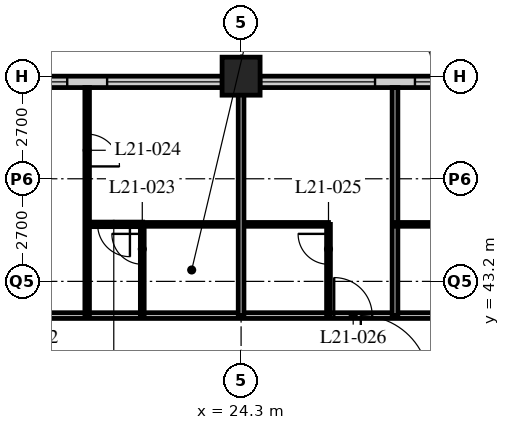
"""IFC4 building model, lengths in metres.
Left out: names, types, materials, properties, quantities, classifications, styles, units other than length and angle.
Written with IfcOpenShell. Run it as: python <this file> out.ifc"""

import sys

from ifc_helpers import new_model, si_unit, direction, frame, frame_2d, origin, origin_2d, place, context, subcontext, project, spatial, rectangle, hollow_rectangle, extrude, element, fill, save


model = new_model("IFC4")
c1 = context("Model", 3, precision=1e-05, world=origin(), true_north=direction((0.0, 1.0)))
c2 = subcontext(c1, "Body", "Model", "MODEL_VIEW")
j1 = project(units=[si_unit("LENGTHUNIT", "METRE"), si_unit("PLANEANGLEUNIT", "RADIAN")], contexts=[c1])
p1 = place(None, origin())
s1 = spatial("IfcSite", under=j1, at=p1, CompositionType="ELEMENT")
p2 = place(p1, origin())
s2 = spatial("IfcBuilding", under=s1, at=p2, CompositionType="ELEMENT")
p3 = place(p2, frame((0.0, 0.0, 84.0)))
s3 = spatial("IfcBuildingStorey", under=s2, at=p3, CompositionType="ELEMENT", Elevation=84.0)
p4 = place(p3, frame((24.3, 48.6, 0.0), z_axis=(0.0, 0.0, 1.0), x_axis=(1.0, 0.0, 0.0)))
e1 = element("IfcColumn", 1, at=p4, inside=s3, PredefinedType="COLUMN", context=c2, shape_type="SweptSolid", body=[
    extrude(hollow_rectangle(XDim=1.0, YDim=1.0, WallThickness=0.1, at=origin_2d()), origin(), (0.0, 0.0, 1.0), 3.4),
])
p5 = place(p3, frame((48.3, 48.45, 0.0), z_axis=(0.0, 0.0, 1.0), x_axis=(-1.0, 0.0, 0.0)))
e2 = element("IfcWall", 2, at=p5, inside=s3, PredefinedType="SOLIDWALL", context=c2, shape_type="SweptSolid", body=[
    extrude(rectangle(XDim=40.2, YDim=0.3, at=frame_2d((20.1, 0.0))), origin(), (0.0, 0.0, 1.0), 3.19),
])
p6 = place(p5, frame((0.225, 0.0, 0.9)))
e3 = element("IfcOpeningElement", 3, at=p6, cuts=e2, PredefinedType="OPENING", context=c2, shape_type="SweptSolid", body=[
    extrude(rectangle(XDim=3.0, YDim=1.5, at=frame_2d((1.5, 0.75))), frame((0.0, 0.16, 0.0), z_axis=(0.0, -1.0, 0.0), x_axis=(1.0, 0.0, 0.0)), (0.0, 0.0, 1.0), 0.32),
])
p7 = place(p5, frame((4.275, 0.0, 0.9)))
e4 = element("IfcOpeningElement", 4, at=p7, cuts=e2, PredefinedType="OPENING", context=c2, shape_type="SweptSolid", body=[
    extrude(rectangle(XDim=3.0, YDim=1.5, at=frame_2d((1.5, 0.75))), frame((0.0, 0.16, 0.0), z_axis=(0.0, -1.0, 0.0), x_axis=(1.0, 0.0, 0.0)), (0.0, 0.0, 1.0), 0.32),
])
p8 = place(p5, frame((8.325, 0.0, 0.9)))
e5 = element("IfcOpeningElement", 5, at=p8, cuts=e2, PredefinedType="OPENING", context=c2, shape_type="SweptSolid", body=[
    extrude(rectangle(XDim=3.0, YDim=1.5, at=frame_2d((1.5, 0.75))), frame((0.0, 0.16, 0.0), z_axis=(0.0, -1.0, 0.0), x_axis=(1.0, 0.0, 0.0)), (0.0, 0.0, 1.0), 0.32),
])
p9 = place(p5, frame((12.375, 0.0, 0.9)))
e6 = element("IfcOpeningElement", 6, at=p9, cuts=e2, PredefinedType="OPENING", context=c2, shape_type="SweptSolid", body=[
    extrude(rectangle(XDim=3.0, YDim=1.5, at=frame_2d((1.5, 0.75))), frame((0.0, 0.16, 0.0), z_axis=(0.0, -1.0, 0.0), x_axis=(1.0, 0.0, 0.0)), (0.0, 0.0, 1.0), 0.32),
])
p10 = place(p5, frame((16.425, 0.0, 0.9)))
e7 = element("IfcOpeningElement", 7, at=p10, cuts=e2, PredefinedType="OPENING", context=c2, shape_type="SweptSolid", body=[
    extrude(rectangle(XDim=3.0, YDim=1.5, at=frame_2d((1.5, 0.75))), frame((0.0, 0.16, 0.0), z_axis=(0.0, -1.0, 0.0), x_axis=(1.0, 0.0, 0.0)), (0.0, 0.0, 1.0), 0.32),
])
p11 = place(p5, frame((20.475, 0.0, 0.9)))
e8 = element("IfcOpeningElement", 8, at=p11, cuts=e2, PredefinedType="OPENING", context=c2, shape_type="SweptSolid", body=[
    extrude(rectangle(XDim=3.0, YDim=1.5, at=frame_2d((1.5, 0.75))), frame((0.0, 0.16, 0.0), z_axis=(0.0, -1.0, 0.0), x_axis=(1.0, 0.0, 0.0)), (0.0, 0.0, 1.0), 0.32),
])
p12 = place(p5, frame((24.525, 0.0, 0.9)))
e9 = element("IfcOpeningElement", 9, at=p12, cuts=e2, PredefinedType="OPENING", context=c2, shape_type="SweptSolid", body=[
    extrude(rectangle(XDim=3.0, YDim=1.5, at=frame_2d((1.5, 0.75))), frame((0.0, 0.16, 0.0), z_axis=(0.0, -1.0, 0.0), x_axis=(1.0, 0.0, 0.0)), (0.0, 0.0, 1.0), 0.32),
])
p13 = place(p5, frame((28.575, 0.0, 0.9)))
e10 = element("IfcOpeningElement", 10, at=p13, cuts=e2, PredefinedType="OPENING", context=c2, shape_type="SweptSolid", body=[
    extrude(rectangle(XDim=3.0, YDim=1.5, at=frame_2d((1.5, 0.75))), frame((0.0, 0.16, 0.0), z_axis=(0.0, -1.0, 0.0), x_axis=(1.0, 0.0, 0.0)), (0.0, 0.0, 1.0), 0.32),
])
p14 = place(p5, frame((32.625, 0.0, 0.9)))
e11 = element("IfcOpeningElement", 11, at=p14, cuts=e2, PredefinedType="OPENING", context=c2, shape_type="SweptSolid", body=[
    extrude(rectangle(XDim=3.0, YDim=1.5, at=frame_2d((1.5, 0.75))), frame((0.0, 0.16, 0.0), z_axis=(0.0, -1.0, 0.0), x_axis=(1.0, 0.0, 0.0)), (0.0, 0.0, 1.0), 0.32),
])
p15 = place(p5, frame((36.675, 0.0, 0.9)))
e12 = element("IfcOpeningElement", 12, at=p15, cuts=e2, PredefinedType="OPENING", context=c2, shape_type="SweptSolid", body=[
    extrude(rectangle(XDim=3.0, YDim=1.5, at=frame_2d((1.5, 0.75))), frame((0.0, 0.16, 0.0), z_axis=(0.0, -1.0, 0.0), x_axis=(1.0, 0.0, 0.0)), (0.0, 0.0, 1.0), 0.32),
])
p16 = place(p3, frame((12.15, 42.3, 0.0), z_axis=(0.0, 0.0, 1.0), x_axis=(1.0, 0.0, 0.0)))
e13 = element("IfcWall", 13, at=p16, inside=s3, PredefinedType="PARTITIONING", context=c2, shape_type="SweptSolid", body=[
    extrude(rectangle(XDim=32.4, YDim=0.15, at=frame_2d((16.2, 0.0))), origin(), (0.0, 0.0, 1.0), 3.19),
])
p17 = place(p16, frame((5.95, 0.0, 0.0)))
e14 = element("IfcOpeningElement", 14, at=p17, cuts=e13, PredefinedType="OPENING", context=c2, shape_type="SweptSolid", body=[
    extrude(rectangle(XDim=1.0, YDim=2.1, at=frame_2d((0.5, 1.05))), frame((0.0, 0.085, 0.0), z_axis=(0.0, -1.0, 0.0), x_axis=(1.0, 0.0, 0.0)), (0.0, 0.0, 1.0), 0.17),
])
p18 = place(p16, frame((14.6, 0.0, 0.0)))
e15 = element("IfcOpeningElement", 15, at=p18, cuts=e13, PredefinedType="OPENING", context=c2, shape_type="SweptSolid", body=[
    extrude(rectangle(XDim=1.0, YDim=2.1, at=frame_2d((0.5, 1.05))), frame((0.0, 0.085, 0.0), z_axis=(0.0, -1.0, 0.0), x_axis=(1.0, 0.0, 0.0)), (0.0, 0.0, 1.0), 0.17),
])
p19 = place(p16, frame((18.65, 0.0, 0.0)))
e16 = element("IfcOpeningElement", 16, at=p19, cuts=e13, PredefinedType="OPENING", context=c2, shape_type="SweptSolid", body=[
    extrude(rectangle(XDim=1.0, YDim=2.1, at=frame_2d((0.5, 1.05))), frame((0.0, 0.085, 0.0), z_axis=(0.0, -1.0, 0.0), x_axis=(1.0, 0.0, 0.0)), (0.0, 0.0, 1.0), 0.17),
])
p20 = place(p16, frame((22.15, 0.0, 0.0)))
e17 = element("IfcOpeningElement", 17, at=p20, cuts=e13, PredefinedType="OPENING", context=c2, shape_type="SweptSolid", body=[
    extrude(rectangle(XDim=1.0, YDim=2.1, at=frame_2d((0.5, 1.05))), frame((0.0, 0.085, 0.0), z_axis=(0.0, -1.0, 0.0), x_axis=(1.0, 0.0, 0.0)), (0.0, 0.0, 1.0), 0.17),
])
p21 = place(p16, frame((29.025, 0.0, 0.0)))
e18 = element("IfcOpeningElement", 18, at=p21, cuts=e13, PredefinedType="OPENING", context=c2, shape_type="SweptSolid", body=[
    extrude(rectangle(XDim=1.0, YDim=2.1, at=frame_2d((0.5, 1.05))), frame((0.0, 0.085, 0.0), z_axis=(0.0, -1.0, 0.0), x_axis=(1.0, 0.0, 0.0)), (0.0, 0.0, 1.0), 0.17),
])
p22 = place(p16, frame((2.375, 0.0, 0.0)))
e19 = element("IfcOpeningElement", 19, at=p22, cuts=e13, PredefinedType="OPENING", context=c2, shape_type="SweptSolid", body=[
    extrude(rectangle(XDim=1.0, YDim=2.1, at=frame_2d((0.5, 1.05))), frame((0.0, 0.085, 0.0), z_axis=(0.0, -1.0, 0.0), x_axis=(1.0, 0.0, 0.0)), (0.0, 0.0, 1.0), 0.17),
])
p23 = place(p3, frame((21.7, 44.7, 0.0), z_axis=(0.0, 0.0, 1.0), x_axis=(1.0, 0.0, 0.0)))
e20 = element("IfcWall", 20, at=p23, inside=s3, PredefinedType="PARTITIONING", context=c2, shape_type="SweptSolid", body=[
    extrude(rectangle(XDim=4.9, YDim=0.1, at=frame_2d((2.45, 0.0))), origin(), (0.0, 0.0, 1.0), 3.19),
])
p24 = place(p3, frame((21.7, 42.3, 0.0), z_axis=(0.0, 0.0, 1.0), x_axis=(0.0, 1.0, 0.0)))
e21 = element("IfcWall", 21, at=p24, inside=s3, PredefinedType="PARTITIONING", context=c2, shape_type="SweptSolid", body=[
    extrude(rectangle(XDim=2.4, YDim=0.1, at=frame_2d((1.2, 0.0))), origin(), (0.0, 0.0, 1.0), 3.19),
])
p25 = place(p24, frame((1.35, 0.0, 0.0)))
e22 = element("IfcOpeningElement", 22, at=p25, cuts=e21, PredefinedType="OPENING", context=c2, shape_type="SweptSolid", body=[
    extrude(rectangle(XDim=0.8, YDim=2.1, at=frame_2d((0.4, 1.05))), frame((0.0, 0.06, 0.0), z_axis=(0.0, -1.0, 0.0), x_axis=(1.0, 0.0, 0.0)), (0.0, 0.0, 1.0), 0.12),
])
p26 = place(p3, frame((20.25, 42.3, 0.0), z_axis=(0.0, 0.0, 1.0), x_axis=(0.0, 1.0, 0.0)))
e23 = element("IfcWall", 23, at=p26, inside=s3, PredefinedType="PARTITIONING", context=c2, shape_type="SweptSolid", body=[
    extrude(rectangle(XDim=6.0, YDim=0.12, at=frame_2d((3.0, 0.0))), origin(), (0.0, 0.0, 1.0), 3.19),
])
p27 = place(p26, frame((3.925, 0.0, 0.0)))
e24 = element("IfcOpeningElement", 24, at=p27, cuts=e23, PredefinedType="OPENING", context=c2, shape_type="SweptSolid", body=[
    extrude(rectangle(XDim=0.85, YDim=2.1, at=frame_2d((0.425, 1.05))), frame((0.0, 0.07, 0.0), z_axis=(0.0, -1.0, 0.0), x_axis=(1.0, 0.0, 0.0)), (0.0, 0.0, 1.0), 0.14),
])
p28 = place(p3, frame((24.3, 42.3, 0.0), z_axis=(0.0, 0.0, 1.0), x_axis=(0.0, 1.0, 0.0)))
e25 = element("IfcWall", 25, at=p28, inside=s3, PredefinedType="PARTITIONING", context=c2, shape_type="SweptSolid", body=[
    extrude(rectangle(XDim=6.0, YDim=0.15, at=frame_2d((3.0, 0.0))), origin(), (0.0, 0.0, 1.0), 2.428),
])
p29 = place(p3, frame((26.6, 42.3, 0.0), z_axis=(0.0, 0.0, 1.0), x_axis=(0.0, 1.0, 0.0)))
e26 = element("IfcWall", 26, at=p29, inside=s3, PredefinedType="PARTITIONING", context=c2, shape_type="SweptSolid", body=[
    extrude(rectangle(XDim=2.4, YDim=0.1, at=frame_2d((1.2, 0.0))), origin(), (0.0, 0.0, 1.0), 3.19),
])
p30 = place(p29, frame((1.35, 0.0, 0.0)))
e27 = element("IfcOpeningElement", 27, at=p30, cuts=e26, PredefinedType="OPENING", context=c2, shape_type="SweptSolid", body=[
    extrude(rectangle(XDim=0.8, YDim=2.1, at=frame_2d((0.4, 1.05))), frame((0.0, 0.06, 0.0), z_axis=(0.0, -1.0, 0.0), x_axis=(1.0, 0.0, 0.0)), (0.0, 0.0, 1.0), 0.12),
])
p31 = place(p3, frame((28.35, 42.3, 0.0), z_axis=(0.0, 0.0, 1.0), x_axis=(0.0, 1.0, 0.0)))
e28 = element("IfcWall", 28, at=p31, inside=s3, PredefinedType="PARTITIONING", context=c2, shape_type="SweptSolid", body=[
    extrude(rectangle(XDim=6.0, YDim=0.15, at=frame_2d((3.0, 0.0))), origin(), (0.0, 0.0, 1.0), 3.19),
])
p32 = place(p3, frame((28.35, 44.7, 0.0), z_axis=(0.0, 0.0, 1.0), x_axis=(1.0, 0.0, 0.0)))
e29 = element("IfcWall", 29, at=p32, inside=s3, PredefinedType="PARTITIONING", context=c2, shape_type="SweptSolid", body=[
    extrude(rectangle(XDim=2.3, YDim=0.1, at=frame_2d((1.15, 0.0))), origin(), (0.0, 0.0, 1.0), 3.19),
])
p33 = place(p3, frame((20.25, 44.7, 0.0), z_axis=(0.0, 0.0, 1.0), x_axis=(1.0, 0.0, 0.0)))
e30 = element("IfcWall", 30, at=p33, inside=s3, PredefinedType="PARTITIONING", context=c2, shape_type="SweptSolid", body=[
    extrude(rectangle(XDim=1.46, YDim=0.12, at=frame_2d((0.73, 0.0))), origin(), (0.0, 0.0, 1.0), 3.19),
])
p34 = place(p33, frame((0.275, 0.0, 0.0)))
e31 = element("IfcOpeningElement", 31, at=p34, cuts=e30, PredefinedType="OPENING", context=c2, shape_type="SweptSolid", body=[
    extrude(rectangle(XDim=0.85, YDim=2.1, at=frame_2d((0.425, 1.05))), frame((0.0, 0.07, 0.0), z_axis=(0.0, -1.0, 0.0), x_axis=(1.0, 0.0, 0.0)), (0.0, 0.0, 1.0), 0.14),
])
p35 = place(p10, origin())
e32 = element("IfcWindow", 32, at=p35, inside=s3, PartitioningType="SINGLE_PANEL", PredefinedType="WINDOW", context=c2, shape_type="SweptSolid", body=[
    extrude(rectangle(XDim=3.0, YDim=1.5, at=frame_2d((1.5, 0.75))), frame((0.0, 0.03, 0.0), z_axis=(0.0, -1.0, 0.0), x_axis=(1.0, 0.0, 0.0)), (0.0, 0.0, 1.0), 0.06),
])
fill(e7, e32)
p36 = place(p11, origin())
e33 = element("IfcWindow", 33, at=p36, inside=s3, PartitioningType="SINGLE_PANEL", PredefinedType="WINDOW", context=c2, shape_type="SweptSolid", body=[
    extrude(rectangle(XDim=3.0, YDim=1.5, at=frame_2d((1.5, 0.75))), frame((0.0, 0.03, 0.0), z_axis=(0.0, -1.0, 0.0), x_axis=(1.0, 0.0, 0.0)), (0.0, 0.0, 1.0), 0.06),
])
fill(e8, e33)
p37 = place(p12, origin())
e34 = element("IfcWindow", 34, at=p37, inside=s3, PartitioningType="SINGLE_PANEL", PredefinedType="WINDOW", context=c2, shape_type="SweptSolid", body=[
    extrude(rectangle(XDim=3.0, YDim=1.5, at=frame_2d((1.5, 0.75))), frame((0.0, 0.03, 0.0), z_axis=(0.0, -1.0, 0.0), x_axis=(1.0, 0.0, 0.0)), (0.0, 0.0, 1.0), 0.06),
])
fill(e9, e34)
p38 = place(p13, origin())
e35 = element("IfcWindow", 35, at=p38, inside=s3, PartitioningType="SINGLE_PANEL", PredefinedType="WINDOW", context=c2, shape_type="SweptSolid", body=[
    extrude(rectangle(XDim=3.0, YDim=1.5, at=frame_2d((1.5, 0.75))), frame((0.0, 0.03, 0.0), z_axis=(0.0, -1.0, 0.0), x_axis=(1.0, 0.0, 0.0)), (0.0, 0.0, 1.0), 0.06),
])
fill(e10, e35)
p39 = place(p25, origin())
e36 = element("IfcDoor", 36, at=p39, inside=s3, OperationType="SINGLE_SWING_RIGHT", PredefinedType="DOOR", context=c2, shape_type="SweptSolid", body=[
    extrude(rectangle(XDim=0.8, YDim=2.1, at=frame_2d((0.4, 1.05))), frame((0.0, 0.025, 0.0), z_axis=(0.0, -1.0, 0.0), x_axis=(1.0, 0.0, 0.0)), (0.0, 0.0, 1.0), 0.05),
])
fill(e22, e36)
p40 = place(p27, origin())
e37 = element("IfcDoor", 37, at=p40, inside=s3, OperationType="SINGLE_SWING_RIGHT", PredefinedType="DOOR", context=c2, shape_type="SweptSolid", body=[
    extrude(rectangle(XDim=0.85, YDim=2.1, at=frame_2d((0.425, 1.05))), frame((0.0, 0.025, 0.0), z_axis=(0.0, -1.0, 0.0), x_axis=(1.0, 0.0, 0.0)), (0.0, 0.0, 1.0), 0.05),
])
fill(e24, e37)
p41 = place(p30, origin())
e38 = element("IfcDoor", 38, at=p41, inside=s3, OperationType="SINGLE_SWING_RIGHT", PredefinedType="DOOR", context=c2, shape_type="SweptSolid", body=[
    extrude(rectangle(XDim=0.8, YDim=2.1, at=frame_2d((0.4, 1.05))), frame((0.0, 0.025, 0.0), z_axis=(0.0, -1.0, 0.0), x_axis=(1.0, 0.0, 0.0)), (0.0, 0.0, 1.0), 0.05),
])
fill(e27, e38)
p42 = place(p18, origin())
e39 = element("IfcDoor", 39, at=p42, inside=s3, OperationType="SINGLE_SWING_LEFT", PredefinedType="DOOR", context=c2, shape_type="SweptSolid", body=[
    extrude(rectangle(XDim=1.0, YDim=2.1, at=frame_2d((0.5, 1.05))), frame((0.0, 0.025, 0.0), z_axis=(0.0, -1.0, 0.0), x_axis=(1.0, 0.0, 0.0)), (0.0, 0.0, 1.0), 0.05),
])
fill(e15, e39)
p43 = place(p34, origin())
e40 = element("IfcDoor", 40, at=p43, inside=s3, OperationType="SINGLE_SWING_LEFT", PredefinedType="DOOR", context=c2, shape_type="SweptSolid", body=[
    extrude(rectangle(XDim=0.85, YDim=2.1, at=frame_2d((0.425, 1.05))), frame((0.0, 0.025, 0.0), z_axis=(0.0, -1.0, 0.0), x_axis=(1.0, 0.0, 0.0)), (0.0, 0.0, 1.0), 0.05),
])
fill(e31, e40)
save(model, sys.argv[1])
